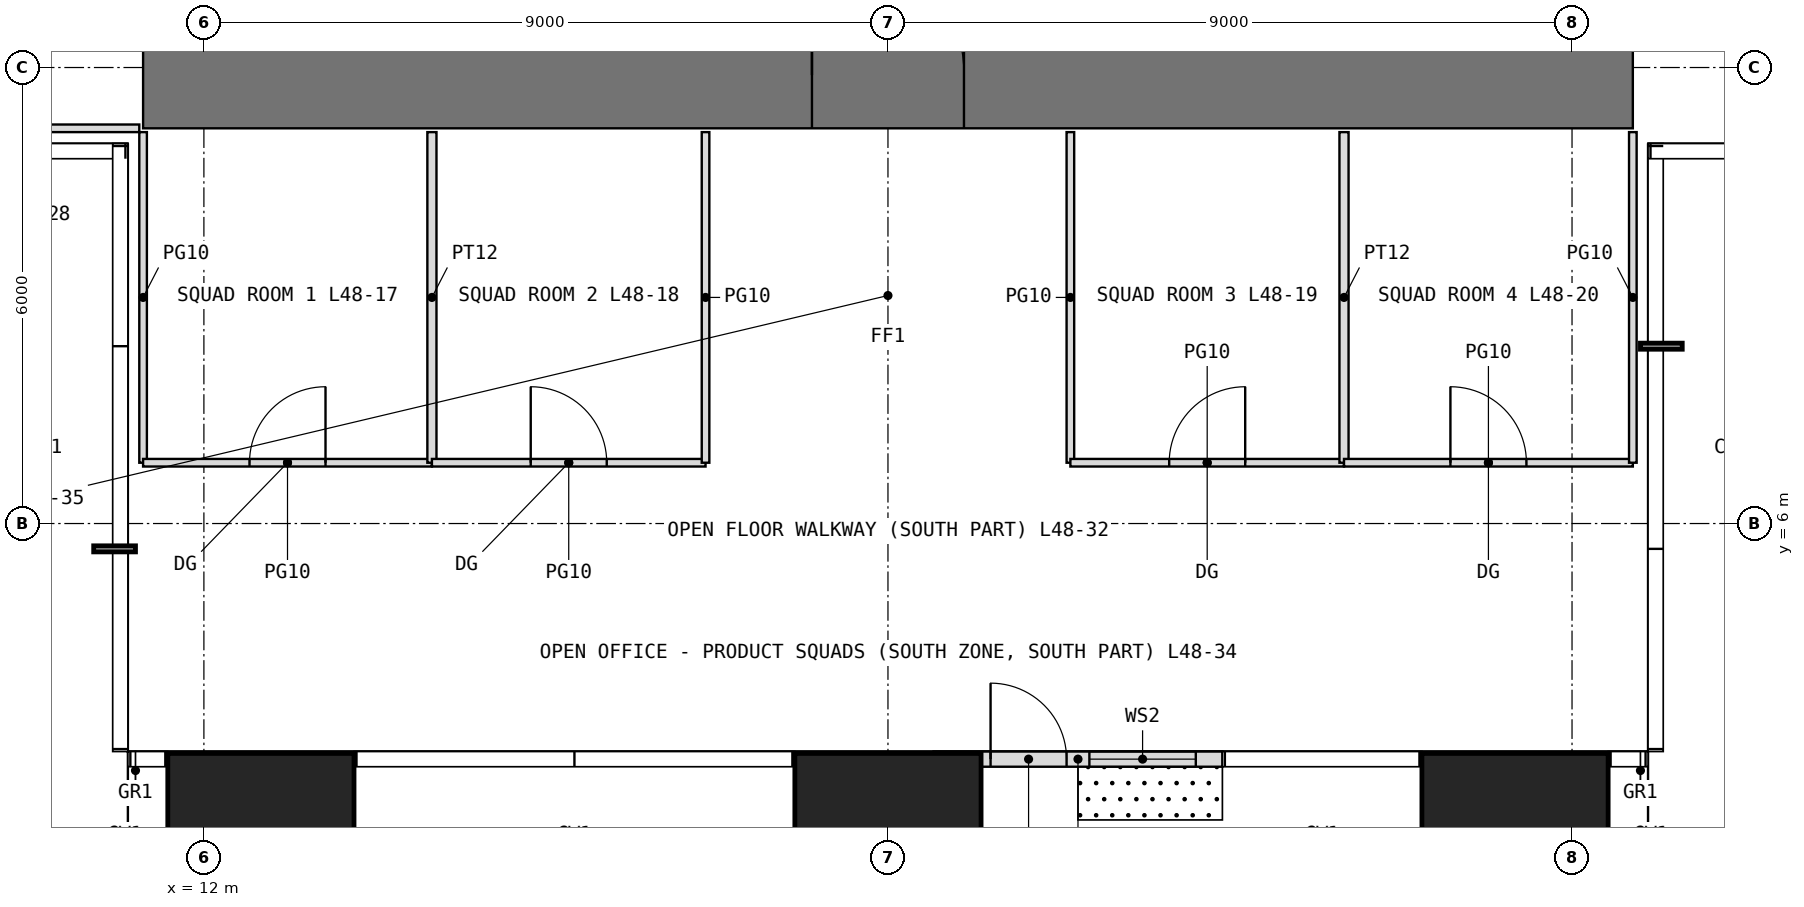
"""IFC4 building model, lengths in metres.
Left out: names, types, materials, properties, quantities, classifications, styles, units other than length and angle.
Written with IfcOpenShell. Run it as: python <this file> out.ifc"""

import sys

from ifc_helpers import new_model, si_unit, direction, frame, frame_2d, origin, origin_2d, place, context, subcontext, project, spatial, rectangle, extrude, element, fill, save


model = new_model("IFC4")
c1 = context("Model", 3, precision=1e-05, world=origin(), true_north=direction((0.0, 1.0)))
c2 = subcontext(c1, "Body", "Model", "MODEL_VIEW")
j1 = project(units=[si_unit("LENGTHUNIT", "METRE"), si_unit("PLANEANGLEUNIT", "RADIAN")], contexts=[c1])
p1 = place(None, origin())
s1 = spatial("IfcSite", under=j1, at=p1, CompositionType="ELEMENT")
p2 = place(p1, origin())
s2 = spatial("IfcBuilding", under=s1, at=p2, CompositionType="ELEMENT")
p3 = place(p2, frame((0.0, 0.0, 202.5)))
s3 = spatial("IfcBuildingStorey", under=s2, at=p3, CompositionType="ELEMENT", Elevation=202.5)
for number, where, z_axis, x_axis in (
    (1, (12.75, 1.75, 0.0), (0.0, 0.0, 1.0), (1.0, 0.0, 0.0)),
    (2, (21.0, 1.75, 0.0), (0.0, 0.0, 1.0), (1.0, 0.0, 0.0)),
    (3, (29.25, 1.75, 0.0), (0.0, 0.0, 1.0), (1.0, 0.0, 0.0)),
):
    element("IfcColumn", number, at=place(p3, frame(where, z_axis=z_axis, x_axis=x_axis)), inside=s3, PredefinedType="COLUMN", context=c2, shape_type="SweptSolid", body=[
        extrude(rectangle(XDim=2.45, YDim=2.45, at=origin_2d()), origin(), (0.0, 0.0, 1.0), 4.0),
    ])
p4 = place(p3, frame((21.6, 2.9, 0.0), z_axis=(0.0, 0.0, 1.0), x_axis=(1.0, 0.0, 0.0)))
e4 = element("IfcWall", 4, at=p4, inside=s3, PredefinedType="USERDEFINED", context=c2, shape_type="SweptSolid", body=[
    extrude(rectangle(XDim=3.8, YDim=0.2, at=frame_2d((1.9, 0.0))), origin(), (0.0, 0.0, 1.0), 3.75),
])
p5 = place(p4, frame((0.75, 0.0, 0.0)))
e5 = element("IfcOpeningElement", 5, at=p5, cuts=e4, PredefinedType="OPENING", context=c2, shape_type="SweptSolid", body=[
    extrude(rectangle(XDim=1.0, YDim=2.4, at=frame_2d((0.5, 1.2))), frame((0.0, 0.11, 0.0), z_axis=(0.0, -1.0, 0.0), x_axis=(1.0, 0.0, 0.0)), (0.0, 0.0, 1.0), 0.22),
])
p6 = place(p4, frame((2.05, 0.0, 0.3)))
e6 = element("IfcOpeningElement", 6, at=p6, cuts=e4, PredefinedType="OPENING", context=c2, shape_type="SweptSolid", body=[
    extrude(rectangle(XDim=1.4, YDim=2.7, at=frame_2d((0.7, 1.35))), frame((0.0, 0.11, 0.0), z_axis=(0.0, -1.0, 0.0), x_axis=(1.0, 0.0, 0.0)), (0.0, 0.0, 1.0), 0.22),
])
p7 = place(p3, frame((11.2, 11.9, -0.05), z_axis=(0.0, 0.0, 1.0), x_axis=(1.0, 0.0, 0.0)))
e7 = element("IfcWall", 7, at=p7, inside=s3, PredefinedType="SHEAR", context=c2, shape_type="SweptSolid", body=[
    extrude(rectangle(XDim=19.6, YDim=1.4, at=frame_2d((9.8, 0.0))), origin(), (0.0, 0.0, 1.0), 4.0),
])
p8 = place(p7, frame((8.8, 0.0, 0.05)))
e8 = element("IfcOpeningElement", 8, at=p8, cuts=e7, PredefinedType="OPENING", context=c2, shape_type="SweptSolid", body=[
    extrude(rectangle(XDim=2.0, YDim=2.2, at=frame_2d((1.0, 1.1))), frame((0.0, 0.71, 0.0), z_axis=(0.0, -1.0, 0.0), x_axis=(1.0, 0.0, 0.0)), (0.0, 0.0, 1.0), 1.42),
])
p9 = place(p3, frame((8.4, 11.2, 0.0), z_axis=(0.0, 0.0, 1.0), x_axis=(1.0, 0.0, 0.0)))
e9 = element("IfcWall", 9, at=p9, inside=s3, PredefinedType="PARTITIONING", context=c2, shape_type="SweptSolid", body=[
    extrude(rectangle(XDim=2.75, YDim=0.1, at=frame_2d((1.375, 0.0))), origin(), (0.0, 0.0, 1.0), 3.75),
])
p10 = place(p3, frame((11.2, 6.8, 0.0), z_axis=(0.0, 0.0, 1.0), x_axis=(0.0, 1.0, 0.0)))
e10 = element("IfcWall", 10, at=p10, inside=s3, PredefinedType="PARTITIONING", context=c2, shape_type="SweptSolid", body=[
    extrude(rectangle(XDim=4.35, YDim=0.1, at=frame_2d((2.175, 0.0))), origin(), (0.0, 0.0, 1.0), 3.75),
])
p11 = place(p3, frame((11.2, 6.8, 0.0), z_axis=(0.0, 0.0, 1.0), x_axis=(1.0, 0.0, 0.0)))
e11 = element("IfcWall", 11, at=p11, inside=s3, PredefinedType="PARTITIONING", context=c2, shape_type="SweptSolid", body=[
    extrude(rectangle(XDim=3.8, YDim=0.1, at=frame_2d((1.9, 0.0))), origin(), (0.0, 0.0, 1.0), 3.75),
])
p12 = place(p11, frame((1.4, 0.0, 0.0)))
e12 = element("IfcOpeningElement", 12, at=p12, cuts=e11, PredefinedType="OPENING", context=c2, shape_type="SweptSolid", body=[
    extrude(rectangle(XDim=1.0, YDim=2.4, at=frame_2d((0.5, 1.2))), frame((0.0, 0.06, 0.0), z_axis=(0.0, -1.0, 0.0), x_axis=(1.0, 0.0, 0.0)), (0.0, 0.0, 1.0), 0.12),
])
p13 = place(p3, frame((15.0, 6.8, 0.0), z_axis=(0.0, 0.0, 1.0), x_axis=(0.0, 1.0, 0.0)))
e13 = element("IfcWall", 13, at=p13, inside=s3, PredefinedType="PARTITIONING", context=c2, shape_type="SweptSolid", body=[
    extrude(rectangle(XDim=4.35, YDim=0.12, at=frame_2d((2.175, 0.0))), origin(), (0.0, 0.0, 1.0), 3.75),
])
p14 = place(p3, frame((15.0, 6.8, 0.0), z_axis=(0.0, 0.0, 1.0), x_axis=(1.0, 0.0, 0.0)))
e14 = element("IfcWall", 14, at=p14, inside=s3, PredefinedType="PARTITIONING", context=c2, shape_type="SweptSolid", body=[
    extrude(rectangle(XDim=3.6, YDim=0.1, at=frame_2d((1.8, 0.0))), origin(), (0.0, 0.0, 1.0), 3.75),
])
p15 = place(p14, frame((1.3, 0.0, 0.0)))
e15 = element("IfcOpeningElement", 15, at=p15, cuts=e14, PredefinedType="OPENING", context=c2, shape_type="SweptSolid", body=[
    extrude(rectangle(XDim=1.0, YDim=2.4, at=frame_2d((0.5, 1.2))), frame((0.0, 0.06, 0.0), z_axis=(0.0, -1.0, 0.0), x_axis=(1.0, 0.0, 0.0)), (0.0, 0.0, 1.0), 0.12),
])
for number, where, z_axis, x_axis in (
    (16, (18.6, 6.8, 0.0), (0.0, 0.0, 1.0), (0.0, 1.0, 0.0)),
    (17, (23.4, 6.8, 0.0), (0.0, 0.0, 1.0), (0.0, 1.0, 0.0)),
):
    element("IfcWall", number, at=place(p3, frame(where, z_axis=z_axis, x_axis=x_axis)), inside=s3, PredefinedType="PARTITIONING", context=c2, shape_type="SweptSolid", body=[
        extrude(rectangle(XDim=4.35, YDim=0.1, at=frame_2d((2.175, 0.0))), origin(), (0.0, 0.0, 1.0), 3.75),
    ])
p16 = place(p3, frame((23.4, 6.8, 0.0), z_axis=(0.0, 0.0, 1.0), x_axis=(1.0, 0.0, 0.0)))
e18 = element("IfcWall", 18, at=p16, inside=s3, PredefinedType="PARTITIONING", context=c2, shape_type="SweptSolid", body=[
    extrude(rectangle(XDim=3.6, YDim=0.1, at=frame_2d((1.8, 0.0))), origin(), (0.0, 0.0, 1.0), 3.75),
])
p17 = place(p16, frame((1.3, 0.0, 0.0)))
e19 = element("IfcOpeningElement", 19, at=p17, cuts=e18, PredefinedType="OPENING", context=c2, shape_type="SweptSolid", body=[
    extrude(rectangle(XDim=1.0, YDim=2.4, at=frame_2d((0.5, 1.2))), frame((0.0, 0.06, 0.0), z_axis=(0.0, -1.0, 0.0), x_axis=(1.0, 0.0, 0.0)), (0.0, 0.0, 1.0), 0.12),
])
p18 = place(p3, frame((27.0, 6.8, 0.0), z_axis=(0.0, 0.0, 1.0), x_axis=(0.0, 1.0, 0.0)))
e20 = element("IfcWall", 20, at=p18, inside=s3, PredefinedType="PARTITIONING", context=c2, shape_type="SweptSolid", body=[
    extrude(rectangle(XDim=4.35, YDim=0.12, at=frame_2d((2.175, 0.0))), origin(), (0.0, 0.0, 1.0), 3.75),
])
p19 = place(p3, frame((27.0, 6.8, 0.0), z_axis=(0.0, 0.0, 1.0), x_axis=(1.0, 0.0, 0.0)))
e21 = element("IfcWall", 21, at=p19, inside=s3, PredefinedType="PARTITIONING", context=c2, shape_type="SweptSolid", body=[
    extrude(rectangle(XDim=3.8, YDim=0.1, at=frame_2d((1.9, 0.0))), origin(), (0.0, 0.0, 1.0), 3.75),
])
p20 = place(p19, frame((1.4, 0.0, 0.0)))
e22 = element("IfcOpeningElement", 22, at=p20, cuts=e21, PredefinedType="OPENING", context=c2, shape_type="SweptSolid", body=[
    extrude(rectangle(XDim=1.0, YDim=2.4, at=frame_2d((0.5, 1.2))), frame((0.0, 0.06, 0.0), z_axis=(0.0, -1.0, 0.0), x_axis=(1.0, 0.0, 0.0)), (0.0, 0.0, 1.0), 0.12),
])
p21 = place(p3, frame((30.8, 6.8, 0.0), z_axis=(0.0, 0.0, 1.0), x_axis=(0.0, 1.0, 0.0)))
e23 = element("IfcWall", 23, at=p21, inside=s3, PredefinedType="PARTITIONING", context=c2, shape_type="SweptSolid", body=[
    extrude(rectangle(XDim=4.35, YDim=0.1, at=frame_2d((2.175, 0.0))), origin(), (0.0, 0.0, 1.0), 3.75),
])
p22 = place(p5, origin())
e24 = element("IfcDoor", 24, at=p22, inside=s3, OperationType="SINGLE_SWING_LEFT", PredefinedType="DOOR", context=c2, shape_type="SweptSolid", body=[
    extrude(rectangle(XDim=1.0, YDim=2.4, at=frame_2d((0.5, 1.2))), frame((0.0, 0.025, 0.0), z_axis=(0.0, -1.0, 0.0), x_axis=(1.0, 0.0, 0.0)), (0.0, 0.0, 1.0), 0.05),
])
fill(e5, e24)
p23 = place(p6, origin())
e25 = element("IfcWindow", 25, at=p23, inside=s3, PartitioningType="SINGLE_PANEL", PredefinedType="WINDOW", context=c2, shape_type="SweptSolid", body=[
    extrude(rectangle(XDim=1.4, YDim=2.7, at=frame_2d((0.7, 1.35))), frame((0.0, 0.03, 0.0), z_axis=(0.0, -1.0, 0.0), x_axis=(1.0, 0.0, 0.0)), (0.0, 0.0, 1.0), 0.06),
])
fill(e6, e25)
p24 = place(p8, origin())
e26 = element("IfcDoor", 26, at=p24, inside=s3, OperationType="DOUBLE_DOOR_SINGLE_SWING", PredefinedType="DOOR", context=c2, shape_type="SweptSolid", body=[
    extrude(rectangle(XDim=2.0, YDim=2.2, at=frame_2d((1.0, 1.1))), frame((0.0, 0.025, 0.0), z_axis=(0.0, -1.0, 0.0), x_axis=(1.0, 0.0, 0.0)), (0.0, 0.0, 1.0), 0.05),
])
fill(e8, e26)
p25 = place(p12, origin())
e27 = element("IfcDoor", 27, at=p25, inside=s3, OperationType="SINGLE_SWING_RIGHT", PredefinedType="DOOR", context=c2, shape_type="SweptSolid", body=[
    extrude(rectangle(XDim=1.0, YDim=2.4, at=frame_2d((0.5, 1.2))), frame((0.0, 0.025, 0.0), z_axis=(0.0, -1.0, 0.0), x_axis=(1.0, 0.0, 0.0)), (0.0, 0.0, 1.0), 0.05),
])
fill(e12, e27)
p26 = place(p15, origin())
e28 = element("IfcDoor", 28, at=p26, inside=s3, OperationType="SINGLE_SWING_LEFT", PredefinedType="DOOR", context=c2, shape_type="SweptSolid", body=[
    extrude(rectangle(XDim=1.0, YDim=2.4, at=frame_2d((0.5, 1.2))), frame((0.0, 0.025, 0.0), z_axis=(0.0, -1.0, 0.0), x_axis=(1.0, 0.0, 0.0)), (0.0, 0.0, 1.0), 0.05),
])
fill(e15, e28)
p27 = place(p17, origin())
e29 = element("IfcDoor", 29, at=p27, inside=s3, OperationType="SINGLE_SWING_RIGHT", PredefinedType="DOOR", context=c2, shape_type="SweptSolid", body=[
    extrude(rectangle(XDim=1.0, YDim=2.4, at=frame_2d((0.5, 1.2))), frame((0.0, 0.025, 0.0), z_axis=(0.0, -1.0, 0.0), x_axis=(1.0, 0.0, 0.0)), (0.0, 0.0, 1.0), 0.05),
])
fill(e19, e29)
p28 = place(p20, origin())
e30 = element("IfcDoor", 30, at=p28, inside=s3, OperationType="SINGLE_SWING_LEFT", PredefinedType="DOOR", context=c2, shape_type="SweptSolid", body=[
    extrude(rectangle(XDim=1.0, YDim=2.4, at=frame_2d((0.5, 1.2))), frame((0.0, 0.025, 0.0), z_axis=(0.0, -1.0, 0.0), x_axis=(1.0, 0.0, 0.0)), (0.0, 0.0, 1.0), 0.05),
])
fill(e22, e30)
save(model, sys.argv[1])
